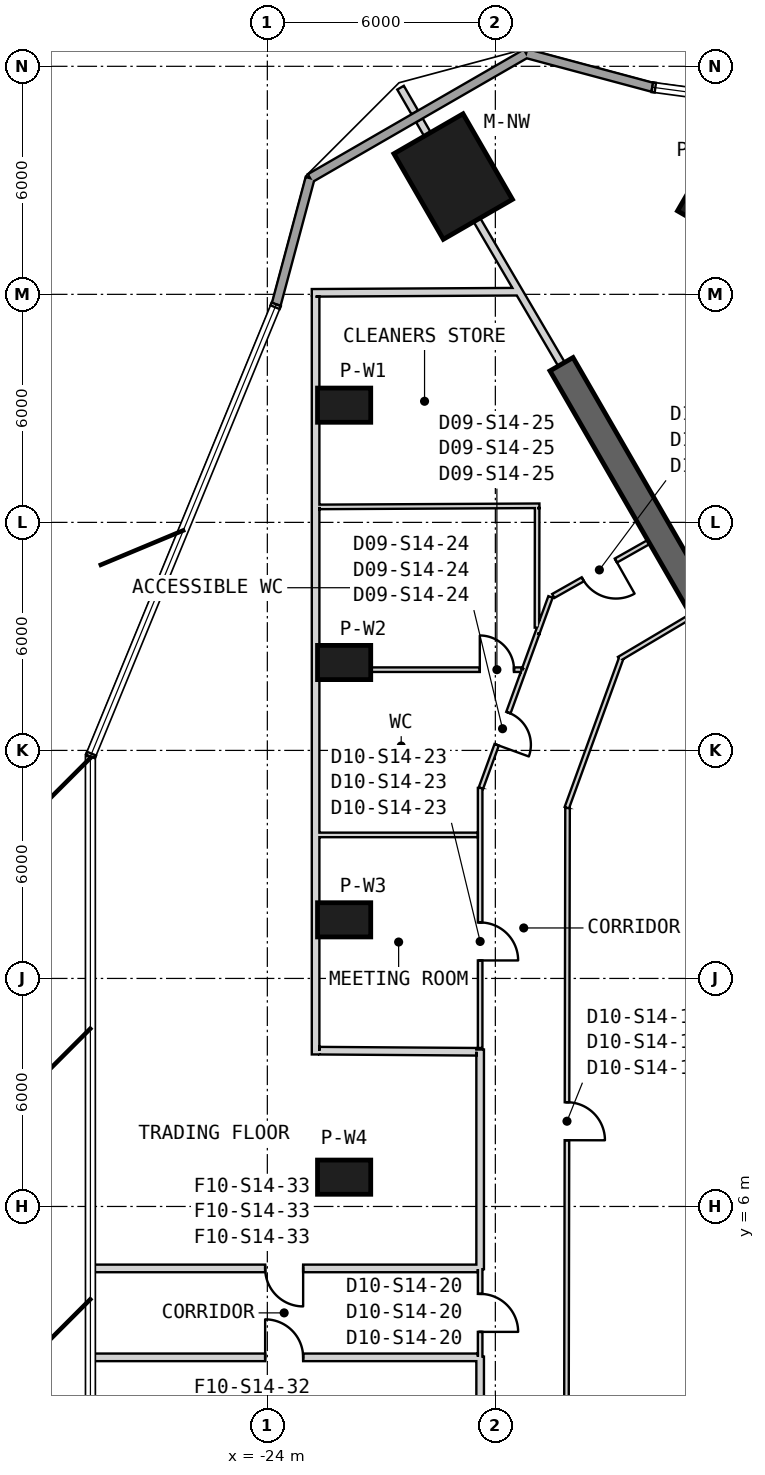
"""IFC4 building model, lengths in metres.
Left out: names, types, materials, properties, quantities, classifications, styles, units other than length and angle.
Written with IfcOpenShell. Run it as: python <this file> out.ifc"""

import sys

from ifc_helpers import new_model, si_unit, direction, frame, frame_2d, origin, origin_2d, place, context, subcontext, project, spatial, rectangle, extrude, element, fill, save


model = new_model("IFC4")
c1 = context("Model", 3, precision=1e-05, world=origin(), true_north=direction((0.0, 1.0)))
c2 = subcontext(c1, "Body", "Model", "MODEL_VIEW")
j1 = project(units=[si_unit("LENGTHUNIT", "METRE"), si_unit("PLANEANGLEUNIT", "RADIAN")], contexts=[c1])
p1 = place(None, origin())
s1 = spatial("IfcSite", under=j1, at=p1, CompositionType="ELEMENT")
p2 = place(p1, origin())
s2 = spatial("IfcBuilding", under=s1, at=p2, CompositionType="ELEMENT")
p3 = place(p2, frame((0.0, 0.0, 229.2)))
s3 = spatial("IfcBuildingStorey", under=s2, at=p3, CompositionType="ELEMENT", Elevation=229.2)
p4 = place(p3, frame((-19.11, 33.099, 0.0), z_axis=(0.0, 0.0, 1.0), x_axis=(-0.5, 0.866025403784, 0.0)))
e1 = element("IfcColumn", 1, at=p4, inside=s3, PredefinedType="COLUMN", context=c2, shape_type="SweptSolid", body=[
    extrude(rectangle(XDim=2.6, YDim=2.1, at=origin_2d()), origin(), (0.0, 0.0, 1.0), 4.0),
])
for number, where, z_axis, x_axis in (
    (2, (-21.979, 27.084, 0.0), (0.0, 0.0, 1.0), (-1.0, 0.0, 0.0)),
    (3, (-21.979, 20.313, 0.0), (0.0, 0.0, 1.0), (-1.0, 0.0, 0.0)),
    (4, (-21.979, 13.542, 0.0), (0.0, 0.0, 1.0), (-1.0, 0.0, 0.0)),
    (5, (-21.979, 6.771, 0.0), (0.0, 0.0, 1.0), (-1.0, 0.0, 0.0)),
    (6, (-12.466, 32.576, 0.0), (0.0, 0.0, 1.0), (0.5, 0.866, 0.0)),
):
    element("IfcColumn", number, at=place(p3, frame(where, z_axis=z_axis, x_axis=x_axis)), inside=s3, PredefinedType="COLUMN", context=c2, shape_type="SweptSolid", body=[
        extrude(rectangle(XDim=1.4, YDim=0.9, at=origin_2d()), origin(), (0.0, 0.0, 1.0), 4.0),
    ])
p5 = place(p3, frame((-10.575, 18.316, 0.0), z_axis=(0.0, 0.0, 1.0), x_axis=(-0.499996344484, 0.866027514288, 0.0)))
e7 = element("IfcWall", 7, at=p5, inside=s3, PredefinedType="SHEAR", context=c2, shape_type="SweptSolid", body=[
    extrude(rectangle(XDim=11.368, YDim=0.7, at=frame_2d((5.684, 0.0))), origin(), (0.0, 0.0, 1.0), 4.0),
])
p6 = place(p3, frame((-13.87, 35.449, 0.0), z_axis=(0.0, 0.0, 1.0), x_axis=(-0.965919522093, 0.258842571536, 0.0)))
e8 = element("IfcWall", 8, at=p6, inside=s3, PredefinedType="SOLIDWALL", context=c2, shape_type="SweptSolid", body=[
    extrude(rectangle(XDim=3.438, YDim=0.24, at=frame_2d((1.719, 0.0))), origin(), (0.0, 0.0, 1.0), 3.7),
])
p7 = place(p3, frame((-17.19, 36.339, 0.0), z_axis=(0.0, 0.0, 1.0), x_axis=(-0.866012172048, -0.50002291734, 0.0)))
e9 = element("IfcWall", 9, at=p7, inside=s3, PredefinedType="SOLIDWALL", context=c2, shape_type="SweptSolid", body=[
    extrude(rectangle(XDim=6.565, YDim=0.24, at=frame_2d((3.282, 0.0))), origin(), (0.0, 0.0, 1.0), 3.7),
])
p8 = place(p3, frame((-22.875, 33.057, 0.0), z_axis=(0.0, 0.0, 1.0), x_axis=(-0.258842571536, -0.965919522093, 0.0)))
e10 = element("IfcWall", 10, at=p8, inside=s3, PredefinedType="SOLIDWALL", context=c2, shape_type="SweptSolid", body=[
    extrude(rectangle(XDim=3.438, YDim=0.24, at=frame_2d((1.719, 0.0))), origin(), (0.0, 0.0, 1.0), 3.7),
])
p9 = place(p3, frame((-12.839, 21.538, 0.0), z_axis=(0.0, 0.0, 1.0), x_axis=(-0.859953000024, -0.510373233771, 0.0)))
e11 = element("IfcWall", 11, at=p9, inside=s3, PredefinedType="PARTITIONING", context=c2, shape_type="SweptSolid", body=[
    extrude(rectangle(XDim=2.215, YDim=0.12, at=frame_2d((1.108, 0.0))), origin(), (0.0, 0.0, 1.0), 3.7),
])
p10 = place(p3, frame((-14.691, 20.419, 0.0), z_axis=(0.0, 0.0, 1.0), x_axis=(-0.342019678743, -0.93969278988, 0.0)))
e12 = element("IfcWall", 12, at=p10, inside=s3, PredefinedType="PARTITIONING", context=c2, shape_type="SweptSolid", body=[
    extrude(rectangle(XDim=4.181, YDim=0.12, at=frame_2d((2.09, 0.0))), origin(), (0.0, 0.0, 1.0), 2.78),
])
p11 = place(p3, frame((-16.1, 16.486, 0.0), z_axis=(0.0, 0.0, 1.0), x_axis=(-0.00180665503, -0.999998367997, 0.0)))
e13 = element("IfcWall", 13, at=p11, inside=s3, PredefinedType="PARTITIONING", context=c2, shape_type="SweptSolid", body=[
    extrude(rectangle(XDim=16.486, YDim=0.12, at=frame_2d((8.243, 0.0))), origin(), (0.0, 0.0, 1.0), 2.88),
])
p12 = place(p11, frame((7.743, 0.0, 0.0)))
e14 = element("IfcOpeningElement", 14, at=p12, cuts=e13, PredefinedType="OPENING", context=c2, shape_type="SweptSolid", body=[
    extrude(rectangle(XDim=1.0, YDim=2.1, at=frame_2d((0.5, 1.05))), frame((0.0, 0.07, 0.0), z_axis=(0.0, -1.0, 0.0), x_axis=(1.0, 0.0, 0.0)), (0.0, 0.0, 1.0), 0.14),
])
p13 = place(p3, frame((-18.4, 17.012, 0.0), z_axis=(0.0, 0.0, 1.0), x_axis=(0.0, -1.0, 0.0)))
e15 = element("IfcWall", 15, at=p13, inside=s3, PredefinedType="PARTITIONING", context=c2, shape_type="SweptSolid", body=[
    extrude(rectangle(XDim=6.842, YDim=0.12, at=frame_2d((3.421, 0.0))), origin(), (0.0, 0.0, 1.0), 2.88),
])
p14 = place(p13, frame((3.539, 0.0, 0.0)))
e16 = element("IfcOpeningElement", 16, at=p14, cuts=e15, PredefinedType="OPENING", context=c2, shape_type="SweptSolid", body=[
    extrude(rectangle(XDim=1.0, YDim=2.1, at=frame_2d((0.5, 1.05))), frame((0.0, 0.07, 0.0), z_axis=(0.0, -1.0, 0.0), x_axis=(1.0, 0.0, 0.0)), (0.0, 0.0, 1.0), 0.14),
])
p15 = place(p3, frame((-18.4, 4.35, 0.0), z_axis=(0.0, 0.0, 1.0), x_axis=(0.0, -1.0, 0.0)))
e17 = element("IfcWall", 17, at=p15, inside=s3, PredefinedType="PARTITIONING", context=c2, shape_type="SweptSolid", body=[
    extrude(rectangle(XDim=2.3, YDim=0.12, at=frame_2d((1.15, 0.0))), origin(), (0.0, 0.0, 1.0), 3.7),
])
p16 = place(p15, frame((0.65, 0.0, 0.0)))
e18 = element("IfcOpeningElement", 18, at=p16, cuts=e17, PredefinedType="OPENING", context=c2, shape_type="SweptSolid", body=[
    extrude(rectangle(XDim=1.0, YDim=2.1, at=frame_2d((0.5, 1.05))), frame((0.0, 0.07, 0.0), z_axis=(0.0, -1.0, 0.0), x_axis=(1.0, 0.0, 0.0)), (0.0, 0.0, 1.0), 0.14),
])
p17 = place(p3, frame((-18.4, 10.13, 0.0), z_axis=(0.0, 0.0, 1.0), x_axis=(0.0, -1.0, 0.0)))
e19 = element("IfcWall", 19, at=p17, inside=s3, PredefinedType="PARTITIONING", context=c2, shape_type="SweptSolid", body=[
    extrude(rectangle(XDim=5.78, YDim=0.2, at=frame_2d((2.89, 0.0))), origin(), (0.0, 0.0, 1.0), 3.07),
])
p18 = place(p3, frame((-18.4, 2.05, 0.0), z_axis=(0.0, 0.0, 1.0), x_axis=(0.0, -1.0, 0.0)))
e20 = element("IfcWall", 20, at=p18, inside=s3, PredefinedType="PARTITIONING", context=c2, shape_type="SweptSolid", body=[
    extrude(rectangle(XDim=1.95, YDim=0.2, at=frame_2d((0.975, 0.0))), origin(), (0.0, 0.0, 1.0), 3.07),
])
p19 = place(p3, frame((-16.549, 22.039, 0.0), z_axis=(0.0, 0.0, 1.0), x_axis=(-0.34206932631, -0.939674718186, 0.0)))
e21 = element("IfcWall", 21, at=p19, inside=s3, PredefinedType="PARTITIONING", context=c2, shape_type="SweptSolid", body=[
    extrude(rectangle(XDim=1.021, YDim=0.12, at=frame_2d((0.511, 0.0))), origin(), (0.0, 0.0, 1.0), 3.7),
])
p20 = place(p3, frame((-16.898, 21.079, 0.0), z_axis=(0.0, 0.0, 1.0), x_axis=(-0.341879433665, -0.939743822984, 0.0)))
e22 = element("IfcWall", 22, at=p20, inside=s3, PredefinedType="PARTITIONING", context=c2, shape_type="SweptSolid", body=[
    extrude(rectangle(XDim=1.006, YDim=0.12, at=frame_2d((0.503, 0.0))), origin(), (0.0, 0.0, 1.0), 2.78),
])
p21 = place(p3, frame((-17.242, 20.134, 0.0), z_axis=(0.0, 0.0, 1.0), x_axis=(-0.34200828308, -0.939696937478, 0.0)))
e23 = element("IfcWall", 23, at=p21, inside=s3, PredefinedType="PARTITIONING", context=c2, shape_type="SweptSolid", body=[
    extrude(rectangle(XDim=3.326, YDim=0.12, at=frame_2d((1.663, 0.0))), origin(), (0.0, 0.0, 1.0), 2.88),
])
p22 = place(p21, frame((1.213, 0.0, 0.0)))
e24 = element("IfcOpeningElement", 24, at=p22, cuts=e23, PredefinedType="OPENING", context=c2, shape_type="SweptSolid", body=[
    extrude(rectangle(XDim=0.9, YDim=2.1, at=frame_2d((0.45, 1.05))), frame((0.0, 0.07, 0.0), z_axis=(0.0, -1.0, 0.0), x_axis=(1.0, 0.0, 0.0)), (0.0, 0.0, 1.0), 0.14),
])
p23 = place(p3, frame((-13.963, 23.484, 0.0), z_axis=(0.0, 0.0, 1.0), x_axis=(-0.870462007122, -0.49223560838, 0.0)))
e25 = element("IfcWall", 25, at=p23, inside=s3, PredefinedType="PARTITIONING", context=c2, shape_type="SweptSolid", body=[
    extrude(rectangle(XDim=2.887, YDim=0.12, at=frame_2d((1.443, 0.0))), origin(), (0.0, 0.0, 1.0), 3.7),
])
p24 = place(p23, frame((0.993, 0.0, 0.0)))
e26 = element("IfcOpeningElement", 26, at=p24, cuts=e25, PredefinedType="OPENING", context=c2, shape_type="SweptSolid", body=[
    extrude(rectangle(XDim=1.0, YDim=2.1, at=frame_2d((0.5, 1.05))), frame((0.0, 0.07, 0.0), z_axis=(0.0, -1.0, 0.0), x_axis=(1.0, 0.0, 0.0)), (0.0, 0.0, 1.0), 0.14),
])
p25 = place(p3, frame((-28.655, 2.03, 0.0), z_axis=(0.0, 0.0, 1.0), x_axis=(1.0, 0.0, 0.0)))
e27 = element("IfcWall", 27, at=p25, inside=s3, PredefinedType="PARTITIONING", context=c2, shape_type="SweptSolid", body=[
    extrude(rectangle(XDim=10.195, YDim=0.2, at=frame_2d((5.098, 0.0))), origin(), (0.0, 0.0, 1.0), 3.7),
])
p26 = place(p25, frame((4.598, 0.0, 0.0)))
e28 = element("IfcOpeningElement", 28, at=p26, cuts=e27, PredefinedType="OPENING", context=c2, shape_type="SweptSolid", body=[
    extrude(rectangle(XDim=1.0, YDim=2.1, at=frame_2d((0.5, 1.05))), frame((0.0, 0.11, 0.0), z_axis=(0.0, -1.0, 0.0), x_axis=(1.0, 0.0, 0.0)), (0.0, 0.0, 1.0), 0.22),
])
p27 = place(p3, frame((-18.46, 4.37, 0.0), z_axis=(0.0, 0.0, 1.0), x_axis=(-1.0, 0.0, 0.0)))
e29 = element("IfcWall", 29, at=p27, inside=s3, PredefinedType="PARTITIONING", context=c2, shape_type="SweptSolid", body=[
    extrude(rectangle(XDim=10.196, YDim=0.2, at=frame_2d((5.098, 0.0))), origin(), (0.0, 0.0, 1.0), 3.7),
])
p28 = place(p27, frame((4.598, 0.0, 0.0)))
e30 = element("IfcOpeningElement", 30, at=p28, cuts=e29, PredefinedType="OPENING", context=c2, shape_type="SweptSolid", body=[
    extrude(rectangle(XDim=1.0, YDim=2.1, at=frame_2d((0.5, 1.05))), frame((0.0, 0.11, 0.0), z_axis=(0.0, -1.0, 0.0), x_axis=(1.0, 0.0, 0.0)), (0.0, 0.0, 1.0), 0.22),
])
p29 = place(p3, frame((-20.495, 35.438, 0.0), z_axis=(0.0, 0.0, 1.0), x_axis=(0.500088105676, -0.865974529972, 0.0)))
e31 = element("IfcWall", 31, at=p29, inside=s3, PredefinedType="PARTITIONING", context=c2, shape_type="SweptSolid", body=[
    extrude(rectangle(XDim=0.751, YDim=0.2, at=frame_2d((0.375, 0.0))), origin(), (0.0, 0.0, 1.0), 3.7),
])
p30 = place(p3, frame((-19.999, 34.579, 0.0), z_axis=(0.0, 0.0, 1.0), x_axis=(0.50001992892, -0.866013897511, 0.0)))
e32 = element("IfcWall", 32, at=p30, inside=s3, PredefinedType="PARTITIONING", context=c2, shape_type="SweptSolid", body=[
    extrude(rectangle(XDim=0.426, YDim=0.2, at=frame_2d((0.213, 0.0))), origin(), (0.0, 0.0, 1.0), 3.7),
])
p31 = place(p3, frame((-18.486, 31.958, 0.0), z_axis=(0.0, 0.0, 1.0), x_axis=(0.505921624166, -0.86257945153, 0.0)))
e33 = element("IfcWall", 33, at=p31, inside=s3, PredefinedType="PARTITIONING", context=c2, shape_type="SweptSolid", body=[
    extrude(rectangle(XDim=4.401, YDim=0.2, at=frame_2d((2.201, 0.0))), origin(), (0.0, 0.0, 1.0), 3.27),
])
p32 = place(p3, frame((-22.73, 10.0, 0.0), z_axis=(0.0, 0.0, 1.0), x_axis=(0.0, 1.0, 0.0)))
e34 = element("IfcWall", 34, at=p32, inside=s3, PredefinedType="PARTITIONING", context=c2, shape_type="SweptSolid", body=[
    extrude(rectangle(XDim=10.124, YDim=0.2, at=frame_2d((5.062, 0.0))), origin(), (0.0, 0.0, 1.0), 3.7),
])
p33 = place(p3, frame((-22.73, 20.124, 0.0), z_axis=(0.0, 0.0, 1.0), x_axis=(0.0, 1.0, 0.0)))
e35 = element("IfcWall", 35, at=p33, inside=s3, PredefinedType="PARTITIONING", context=c2, shape_type="SweptSolid", body=[
    extrude(rectangle(XDim=4.282, YDim=0.2, at=frame_2d((2.141, 0.0))), origin(), (0.0, 0.0, 1.0), 3.7),
])
p34 = place(p3, frame((-22.73, 24.406, 0.0), z_axis=(0.0, 0.0, 1.0), x_axis=(0.0, 1.0, 0.0)))
e36 = element("IfcWall", 36, at=p34, inside=s3, PredefinedType="PARTITIONING", context=c2, shape_type="SweptSolid", body=[
    extrude(rectangle(XDim=5.533, YDim=0.2, at=frame_2d((2.767, 0.0))), origin(), (0.0, 0.0, 1.0), 3.7),
])
p35 = place(p3, frame((-22.63, 10.099, 0.0), z_axis=(0.0, 0.0, 1.0), x_axis=(0.999976081673, -0.006916363298, 0.0)))
e37 = element("IfcWall", 37, at=p35, inside=s3, PredefinedType="PARTITIONING", context=c2, shape_type="SweptSolid", body=[
    extrude(rectangle(XDim=4.13, YDim=0.2, at=frame_2d((2.065, 0.0))), origin(), (0.0, 0.0, 1.0), 3.7),
])
p36 = place(p3, frame((-17.361, 30.07, 0.0), z_axis=(0.0, 0.0, 1.0), x_axis=(-0.999984432951, -0.005579772079, 0.0)))
e38 = element("IfcWall", 38, at=p36, inside=s3, PredefinedType="PARTITIONING", context=c2, shape_type="SweptSolid", body=[
    extrude(rectangle(XDim=5.469, YDim=0.2, at=frame_2d((2.735, 0.0))), origin(), (0.0, 0.0, 1.0), 3.27),
])
p37 = place(p3, frame((-18.46, 15.776, 0.0), z_axis=(0.0, 0.0, 1.0), x_axis=(-1.0, 0.0, 0.0)))
e39 = element("IfcWall", 39, at=p37, inside=s3, PredefinedType="PARTITIONING", context=c2, shape_type="SweptSolid", body=[
    extrude(rectangle(XDim=4.17, YDim=0.12, at=frame_2d((2.085, 0.0))), origin(), (0.0, 0.0, 1.0), 3.7),
])
p38 = place(p3, frame((-22.63, 20.124, 0.0), z_axis=(0.0, 0.0, 1.0), x_axis=(1.0, 0.0, 0.0)))
e40 = element("IfcWall", 40, at=p38, inside=s3, PredefinedType="PARTITIONING", context=c2, shape_type="SweptSolid", body=[
    extrude(rectangle(XDim=5.321, YDim=0.12, at=frame_2d((2.66, 0.0))), origin(), (0.0, 0.0, 1.0), 3.7),
])
p39 = place(p38, frame((4.221, 0.0, 0.0)))
e41 = element("IfcOpeningElement", 41, at=p39, cuts=e40, PredefinedType="OPENING", context=c2, shape_type="SweptSolid", body=[
    extrude(rectangle(XDim=0.9, YDim=2.1, at=frame_2d((0.45, 1.05))), frame((0.0, 0.07, 0.0), z_axis=(0.0, -1.0, 0.0), x_axis=(1.0, 0.0, 0.0)), (0.0, 0.0, 1.0), 0.14),
])
p40 = place(p3, frame((-22.63, 24.407, 0.0), z_axis=(0.0, 0.0, 1.0), x_axis=(0.999986767717, 0.005144355288, 0.0)))
e42 = element("IfcWall", 42, at=p40, inside=s3, PredefinedType="PARTITIONING", context=c2, shape_type="SweptSolid", body=[
    extrude(rectangle(XDim=5.79, YDim=0.12, at=frame_2d((2.895, 0.0))), origin(), (0.0, 0.0, 1.0), 2.78),
])
p41 = place(p3, frame((-16.905, 21.23, 0.0), z_axis=(0.0, 0.0, 1.0), x_axis=(0.001474466813, 0.999998912973, 0.0)))
e43 = element("IfcWall", 43, at=p41, inside=s3, PredefinedType="PARTITIONING", context=c2, shape_type="SweptSolid", body=[
    extrude(rectangle(XDim=3.146, YDim=0.12, at=frame_2d((1.573, 0.0))), origin(), (0.0, 0.0, 1.0), 3.7),
])
p42 = place(p12, origin())
e44 = element("IfcDoor", 44, at=p42, inside=s3, OperationType="SINGLE_SWING_RIGHT", PredefinedType="NOTDEFINED", context=c2, shape_type="SweptSolid", body=[
    extrude(rectangle(XDim=1.0, YDim=2.1, at=frame_2d((0.5, 1.05))), frame((0.0, 0.025, 0.0), z_axis=(0.0, -1.0, 0.0), x_axis=(1.0, 0.0, 0.0)), (0.0, 0.0, 1.0), 0.05),
])
fill(e14, e44)
p43 = place(p16, origin())
e45 = element("IfcDoor", 45, at=p43, inside=s3, OperationType="SINGLE_SWING_RIGHT", PredefinedType="NOTDEFINED", context=c2, shape_type="SweptSolid", body=[
    extrude(rectangle(XDim=1.0, YDim=2.1, at=frame_2d((0.5, 1.05))), frame((0.0, 0.025, 0.0), z_axis=(0.0, -1.0, 0.0), x_axis=(1.0, 0.0, 0.0)), (0.0, 0.0, 1.0), 0.05),
])
fill(e18, e45)
p44 = place(p14, origin())
e46 = element("IfcDoor", 46, at=p44, inside=s3, OperationType="SINGLE_SWING_LEFT", PredefinedType="NOTDEFINED", context=c2, shape_type="SweptSolid", body=[
    extrude(rectangle(XDim=1.0, YDim=2.1, at=frame_2d((0.5, 1.05))), frame((0.0, 0.025, 0.0), z_axis=(0.0, -1.0, 0.0), x_axis=(1.0, 0.0, 0.0)), (0.0, 0.0, 1.0), 0.05),
])
fill(e16, e46)
p45 = place(p22, origin())
e47 = element("IfcDoor", 47, at=p45, inside=s3, OperationType="SINGLE_SWING_RIGHT", PredefinedType="NOTDEFINED", context=c2, shape_type="SweptSolid", body=[
    extrude(rectangle(XDim=0.9, YDim=2.1, at=frame_2d((0.45, 1.05))), frame((0.0, 0.025, 0.0), z_axis=(0.0, -1.0, 0.0), x_axis=(1.0, 0.0, 0.0)), (0.0, 0.0, 1.0), 0.05),
])
fill(e24, e47)
p46 = place(p39, origin())
e48 = element("IfcDoor", 48, at=p46, inside=s3, OperationType="SINGLE_SWING_RIGHT", PredefinedType="NOTDEFINED", context=c2, shape_type="SweptSolid", body=[
    extrude(rectangle(XDim=0.9, YDim=2.1, at=frame_2d((0.45, 1.05))), frame((0.0, 0.025, 0.0), z_axis=(0.0, -1.0, 0.0), x_axis=(1.0, 0.0, 0.0)), (0.0, 0.0, 1.0), 0.05),
])
fill(e41, e48)
p47 = place(p24, origin())
e49 = element("IfcDoor", 49, at=p47, inside=s3, OperationType="SINGLE_SWING_LEFT", PredefinedType="NOTDEFINED", context=c2, shape_type="SweptSolid", body=[
    extrude(rectangle(XDim=1.0, YDim=2.1, at=frame_2d((0.5, 1.05))), frame((0.0, 0.025, 0.0), z_axis=(0.0, -1.0, 0.0), x_axis=(1.0, 0.0, 0.0)), (0.0, 0.0, 1.0), 0.05),
])
fill(e26, e49)
p48 = place(p26, origin())
e50 = element("IfcDoor", 50, at=p48, inside=s3, OperationType="SINGLE_SWING_LEFT", PredefinedType="USERDEFINED", context=c2, shape_type="SweptSolid", body=[
    extrude(rectangle(XDim=1.0, YDim=2.1, at=frame_2d((0.5, 1.05))), frame((0.0, 0.025, 0.0), z_axis=(0.0, -1.0, 0.0), x_axis=(1.0, 0.0, 0.0)), (0.0, 0.0, 1.0), 0.05),
])
fill(e28, e50)
p49 = place(p28, origin())
e51 = element("IfcDoor", 51, at=p49, inside=s3, OperationType="SINGLE_SWING_RIGHT", PredefinedType="USERDEFINED", context=c2, shape_type="SweptSolid", body=[
    extrude(rectangle(XDim=1.0, YDim=2.1, at=frame_2d((0.5, 1.05))), frame((0.0, 0.025, 0.0), z_axis=(0.0, -1.0, 0.0), x_axis=(1.0, 0.0, 0.0)), (0.0, 0.0, 1.0), 0.05),
])
fill(e30, e51)
save(model, sys.argv[1])
